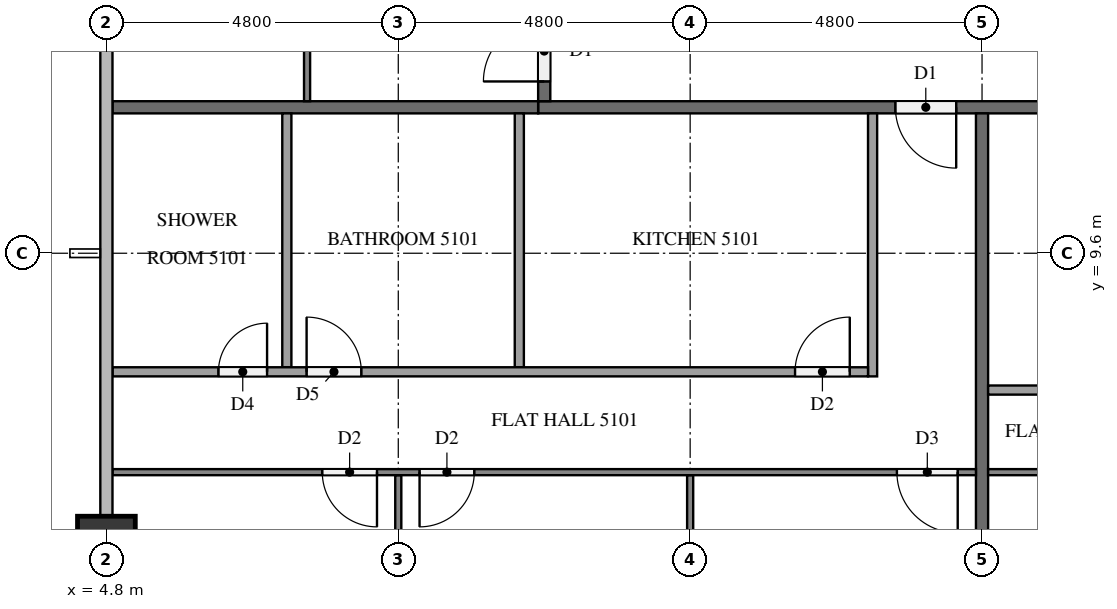
"""IFC4 building model, lengths in metres.
Left out: names, types, materials, properties, quantities, classifications, styles, units other than length and angle.
Written with IfcOpenShell. Run it as: python <this file> out.ifc"""

import sys

from ifc_helpers import new_model, si_unit, direction, frame, frame_2d, origin, origin_2d, place, context, subcontext, project, spatial, rectangle, extrude, element, fill, save


model = new_model("IFC4")
c1 = context("Model", 3, precision=1e-05, world=origin(), true_north=direction((0.0, 1.0)))
c2 = subcontext(c1, "Body", "Model", "MODEL_VIEW")
j1 = project(units=[si_unit("LENGTHUNIT", "METRE"), si_unit("PLANEANGLEUNIT", "RADIAN")], contexts=[c1])
p1 = place(None, origin())
s1 = spatial("IfcSite", under=j1, at=p1, CompositionType="ELEMENT")
p2 = place(p1, origin())
s2 = spatial("IfcBuilding", under=s1, at=p2, CompositionType="ELEMENT")
p3 = place(p2, frame((0.0, 0.0, 196.4)))
s3 = spatial("IfcBuildingStorey", under=s2, at=p3, CompositionType="ELEMENT", Elevation=196.4)
p4 = place(p3, frame((4.8, 4.8, 0.0), z_axis=(0.0, 0.0, 1.0), x_axis=(1.0, 0.0, 0.0)))
e1 = element("IfcColumn", 1, at=p4, inside=s3, PredefinedType="COLUMN", context=c2, shape_type="SweptSolid", body=[
    extrude(rectangle(XDim=0.95, YDim=0.95, at=origin_2d()), origin(), (0.0, 0.0, 1.0), 3.2),
])
p5 = place(p3, frame((50.5, 12.0, 0.0), z_axis=(0.0, 0.0, 1.0), x_axis=(-1.0, 0.0, 0.0)))
e2 = element("IfcWall", 2, at=p5, inside=s3, PredefinedType="PARTITIONING", context=c2, shape_type="SweptSolid", body=[
    extrude(rectangle(XDim=38.6, YDim=0.2, at=frame_2d((19.3, 0.0))), origin(), (0.0, 0.0, 1.0), 3.2),
])
p6 = place(p5, frame((31.725, 0.0, 0.0)))
e3 = element("IfcOpeningElement", 3, at=p6, cuts=e2, PredefinedType="OPENING", context=c2, shape_type="SweptSolid", body=[
    extrude(rectangle(XDim=1.0, YDim=2.1, at=frame_2d((0.5, 1.05))), frame((0.0, 0.11, 0.0), z_axis=(0.0, -1.0, 0.0), x_axis=(1.0, 0.0, 0.0)), (0.0, 0.0, 1.0), 0.22),
])
p7 = place(p5, frame((19.725, 0.0, 0.0)))
e4 = element("IfcOpeningElement", 4, at=p7, cuts=e2, PredefinedType="OPENING", context=c2, shape_type="SweptSolid", body=[
    extrude(rectangle(XDim=1.0, YDim=2.1, at=frame_2d((0.5, 1.05))), frame((0.0, 0.11, 0.0), z_axis=(0.0, -1.0, 0.0), x_axis=(1.0, 0.0, 0.0)), (0.0, 0.0, 1.0), 0.22),
])
p8 = place(p5, frame((17.875, 0.0, 0.0)))
e5 = element("IfcOpeningElement", 5, at=p8, cuts=e2, PredefinedType="OPENING", context=c2, shape_type="SweptSolid", body=[
    extrude(rectangle(XDim=1.0, YDim=2.1, at=frame_2d((0.5, 1.05))), frame((0.0, 0.11, 0.0), z_axis=(0.0, -1.0, 0.0), x_axis=(1.0, 0.0, 0.0)), (0.0, 0.0, 1.0), 0.22),
])
p9 = place(p5, frame((3.475, 0.0, 0.0)))
e6 = element("IfcOpeningElement", 6, at=p9, cuts=e2, PredefinedType="OPENING", context=c2, shape_type="SweptSolid", body=[
    extrude(rectangle(XDim=1.0, YDim=2.1, at=frame_2d((0.5, 1.05))), frame((0.0, 0.11, 0.0), z_axis=(0.0, -1.0, 0.0), x_axis=(1.0, 0.0, 0.0)), (0.0, 0.0, 1.0), 0.22),
])
p10 = place(p3, frame((12.0, 12.1, 0.0), z_axis=(0.0, 0.0, 1.0), x_axis=(0.0, 1.0, 0.0)))
e7 = element("IfcWall", 7, at=p10, inside=s3, PredefinedType="PARTITIONING", context=c2, shape_type="SweptSolid", body=[
    extrude(rectangle(XDim=28.6, YDim=0.2, at=frame_2d((14.3, 0.0))), origin(), (0.0, 0.0, 1.0), 3.2),
])
p11 = place(p10, frame((27.275, 0.0, 0.0)))
e8 = element("IfcOpeningElement", 8, at=p11, cuts=e7, PredefinedType="OPENING", context=c2, shape_type="SweptSolid", body=[
    extrude(rectangle(XDim=1.0, YDim=2.1, at=frame_2d((0.5, 1.05))), frame((0.0, 0.11, 0.0), z_axis=(0.0, -1.0, 0.0), x_axis=(1.0, 0.0, 0.0)), (0.0, 0.0, 1.0), 0.22),
])
p12 = place(p10, frame((0.325, 0.0, 0.0)))
e9 = element("IfcOpeningElement", 9, at=p12, cuts=e7, PredefinedType="OPENING", context=c2, shape_type="SweptSolid", body=[
    extrude(rectangle(XDim=1.0, YDim=2.1, at=frame_2d((0.5, 1.05))), frame((0.0, 0.11, 0.0), z_axis=(0.0, -1.0, 0.0), x_axis=(1.0, 0.0, 0.0)), (0.0, 0.0, 1.0), 0.22),
])
p13 = place(p3, frame((19.2, 11.9, 0.0), z_axis=(0.0, 0.0, 1.0), x_axis=(0.0, -1.0, 0.0)))
e10 = element("IfcWall", 10, at=p13, inside=s3, PredefinedType="PARTITIONING", context=c2, shape_type="SweptSolid", body=[
    extrude(rectangle(XDim=11.575, YDim=0.2, at=frame_2d((5.788, 0.0))), origin(), (0.0, 0.0, 1.0), 3.2),
])
p14 = place(p3, frame((4.9, 12.0, 0.0), z_axis=(0.0, 0.0, 1.0), x_axis=(1.0, 0.0, 0.0)))
e11 = element("IfcWall", 11, at=p14, inside=s3, PredefinedType="PARTITIONING", context=c2, shape_type="SweptSolid", body=[
    extrude(rectangle(XDim=7.0, YDim=0.2, at=frame_2d((3.5, 0.0))), origin(), (0.0, 0.0, 1.0), 3.2),
])
p15 = place(p3, frame((14.4, 5.95, 0.0), z_axis=(0.0, 0.0, 1.0), x_axis=(0.0, -1.0, 0.0)))
e12 = element("IfcWall", 12, at=p15, inside=s3, PredefinedType="PARTITIONING", context=c2, shape_type="SweptSolid", body=[
    extrude(rectangle(XDim=5.85, YDim=0.1, at=frame_2d((2.925, 0.0))), origin(), (0.0, 0.0, 1.0), 3.2),
])
p16 = place(p3, frame((9.6, 5.95, 0.0), z_axis=(0.0, 0.0, 1.0), x_axis=(0.0, -1.0, 0.0)))
e13 = element("IfcWall", 13, at=p16, inside=s3, PredefinedType="PARTITIONING", context=c2, shape_type="SweptSolid", body=[
    extrude(rectangle(XDim=5.475, YDim=0.1, at=frame_2d((2.737, 0.0))), origin(), (0.0, 0.0, 1.0), 3.2),
])
p17 = place(p3, frame((19.1, 6.0, 0.0), z_axis=(0.0, 0.0, 1.0), x_axis=(-1.0, 0.0, 0.0)))
e14 = element("IfcWall", 14, at=p17, inside=s3, PredefinedType="PARTITIONING", context=c2, shape_type="SweptSolid", body=[
    extrude(rectangle(XDim=14.2, YDim=0.1, at=frame_2d((7.1, 0.0))), origin(), (0.0, 0.0, 1.0), 3.2),
])
p18 = place(p17, frame((0.3, 0.0, 0.0)))
e15 = element("IfcOpeningElement", 15, at=p18, cuts=e14, PredefinedType="OPENING", context=c2, shape_type="SweptSolid", body=[
    extrude(rectangle(XDim=1.0, YDim=2.1, at=frame_2d((0.5, 1.05))), frame((0.0, 0.06, 0.0), z_axis=(0.0, -1.0, 0.0), x_axis=(1.0, 0.0, 0.0)), (0.0, 0.0, 1.0), 0.12),
])
p19 = place(p17, frame((8.25, 0.0, 0.0)))
e16 = element("IfcOpeningElement", 16, at=p19, cuts=e14, PredefinedType="OPENING", context=c2, shape_type="SweptSolid", body=[
    extrude(rectangle(XDim=0.9, YDim=2.1, at=frame_2d((0.45, 1.05))), frame((0.0, 0.06, 0.0), z_axis=(0.0, -1.0, 0.0), x_axis=(1.0, 0.0, 0.0)), (0.0, 0.0, 1.0), 0.12),
])
p20 = place(p17, frame((9.85, 0.0, 0.0)))
e17 = element("IfcOpeningElement", 17, at=p20, cuts=e14, PredefinedType="OPENING", context=c2, shape_type="SweptSolid", body=[
    extrude(rectangle(XDim=0.9, YDim=2.1, at=frame_2d((0.45, 1.05))), frame((0.0, 0.06, 0.0), z_axis=(0.0, -1.0, 0.0), x_axis=(1.0, 0.0, 0.0)), (0.0, 0.0, 1.0), 0.12),
])
for number, where, z_axis, x_axis in (
    (18, (11.59, 11.9, 0.0), (0.0, 0.0, 1.0), (0.0, -1.0, 0.0)),
    (19, (7.767, 11.9, 0.0), (0.0, 0.0, 1.0), (0.0, -1.0, 0.0)),
):
    element("IfcWall", number, at=place(p3, frame(where, z_axis=z_axis, x_axis=x_axis)), inside=s3, PredefinedType="PARTITIONING", context=c2, shape_type="SweptSolid", body=[
        extrude(rectangle(XDim=4.175, YDim=0.15, at=frame_2d((2.087, 0.0))), origin(), (0.0, 0.0, 1.0), 3.2),
    ])
p21 = place(p3, frame((17.4, 11.9, 0.0), z_axis=(0.0, 0.0, 1.0), x_axis=(0.0, -1.0, 0.0)))
e20 = element("IfcWall", 20, at=p21, inside=s3, PredefinedType="PARTITIONING", context=c2, shape_type="SweptSolid", body=[
    extrude(rectangle(XDim=4.325, YDim=0.15, at=frame_2d((2.163, 0.0))), origin(), (0.0, 0.0, 1.0), 3.2),
])
p22 = place(p3, frame((4.9, 7.65, 0.0), z_axis=(0.0, 0.0, 1.0), x_axis=(1.0, 0.0, 0.0)))
e21 = element("IfcWall", 21, at=p22, inside=s3, PredefinedType="PARTITIONING", context=c2, shape_type="SweptSolid", body=[
    extrude(rectangle(XDim=12.425, YDim=0.15, at=frame_2d((6.212, 0.0))), origin(), (0.0, 0.0, 1.0), 3.2),
])
p23 = place(p22, frame((11.225, 0.0, 0.0)))
e22 = element("IfcOpeningElement", 22, at=p23, cuts=e21, PredefinedType="OPENING", context=c2, shape_type="SweptSolid", body=[
    extrude(rectangle(XDim=0.9, YDim=2.1, at=frame_2d((0.45, 1.05))), frame((0.0, 0.085, 0.0), z_axis=(0.0, -1.0, 0.0), x_axis=(1.0, 0.0, 0.0)), (0.0, 0.0, 1.0), 0.17),
])
p24 = place(p22, frame((3.192, 0.0, 0.0)))
e23 = element("IfcOpeningElement", 23, at=p24, cuts=e21, PredefinedType="OPENING", context=c2, shape_type="SweptSolid", body=[
    extrude(rectangle(XDim=0.9, YDim=2.1, at=frame_2d((0.45, 1.05))), frame((0.0, 0.085, 0.0), z_axis=(0.0, -1.0, 0.0), x_axis=(1.0, 0.0, 0.0)), (0.0, 0.0, 1.0), 0.17),
])
p25 = place(p22, frame((1.742, 0.0, 0.0)))
e24 = element("IfcOpeningElement", 24, at=p25, cuts=e21, PredefinedType="OPENING", context=c2, shape_type="SweptSolid", body=[
    extrude(rectangle(XDim=0.8, YDim=2.1, at=frame_2d((0.4, 1.05))), frame((0.0, 0.085, 0.0), z_axis=(0.0, -1.0, 0.0), x_axis=(1.0, 0.0, 0.0)), (0.0, 0.0, 1.0), 0.17),
])
p26 = place(p3, frame((31.1, 6.0, 0.0), z_axis=(0.0, 0.0, 1.0), x_axis=(-1.0, 0.0, 0.0)))
e25 = element("IfcWall", 25, at=p26, inside=s3, PredefinedType="PARTITIONING", context=c2, shape_type="SweptSolid", body=[
    extrude(rectangle(XDim=11.8, YDim=0.1, at=frame_2d((5.9, 0.0))), origin(), (0.0, 0.0, 1.0), 3.2),
])
p27 = place(p26, frame((5.75, 0.0, 0.0)))
e26 = element("IfcOpeningElement", 26, at=p27, cuts=e25, PredefinedType="OPENING", context=c2, shape_type="SweptSolid", body=[
    extrude(rectangle(XDim=1.0, YDim=2.1, at=frame_2d((0.5, 1.05))), frame((0.0, 0.06, 0.0), z_axis=(0.0, -1.0, 0.0), x_axis=(1.0, 0.0, 0.0)), (0.0, 0.0, 1.0), 0.12),
])
p28 = place(p26, frame((7.45, 0.0, 0.0)))
e27 = element("IfcOpeningElement", 27, at=p28, cuts=e25, PredefinedType="OPENING", context=c2, shape_type="SweptSolid", body=[
    extrude(rectangle(XDim=0.9, YDim=2.1, at=frame_2d((0.45, 1.05))), frame((0.0, 0.06, 0.0), z_axis=(0.0, -1.0, 0.0), x_axis=(1.0, 0.0, 0.0)), (0.0, 0.0, 1.0), 0.12),
])
p29 = place(p3, frame((19.3, 7.35, 0.0), z_axis=(0.0, 0.0, 1.0), x_axis=(1.0, 0.0, 0.0)))
e28 = element("IfcWall", 28, at=p29, inside=s3, PredefinedType="PARTITIONING", context=c2, shape_type="SweptSolid", body=[
    extrude(rectangle(XDim=10.025, YDim=0.15, at=frame_2d((5.012, 0.0))), origin(), (0.0, 0.0, 1.0), 3.2),
])
p30 = place(p29, frame((6.34, 0.0, 0.0)))
e29 = element("IfcOpeningElement", 29, at=p30, cuts=e28, PredefinedType="OPENING", context=c2, shape_type="SweptSolid", body=[
    extrude(rectangle(XDim=0.8, YDim=2.1, at=frame_2d((0.4, 1.05))), frame((0.0, 0.085, 0.0), z_axis=(0.0, -1.0, 0.0), x_axis=(1.0, 0.0, 0.0)), (0.0, 0.0, 1.0), 0.17),
])
p31 = place(p29, frame((4.79, 0.0, 0.0)))
e30 = element("IfcOpeningElement", 30, at=p31, cuts=e28, PredefinedType="OPENING", context=c2, shape_type="SweptSolid", body=[
    extrude(rectangle(XDim=0.9, YDim=2.1, at=frame_2d((0.45, 1.05))), frame((0.0, 0.085, 0.0), z_axis=(0.0, -1.0, 0.0), x_axis=(1.0, 0.0, 0.0)), (0.0, 0.0, 1.0), 0.17),
])
p32 = place(p3, frame((8.1, 12.1, 0.0), z_axis=(0.0, 0.0, 1.0), x_axis=(0.0, 1.0, 0.0)))
e31 = element("IfcWall", 31, at=p32, inside=s3, PredefinedType="PARTITIONING", context=c2, shape_type="SweptSolid", body=[
    extrude(rectangle(XDim=14.2, YDim=0.1, at=frame_2d((7.1, 0.0))), origin(), (0.0, 0.0, 1.0), 3.2),
])
p33 = place(p32, frame((3.45, 0.0, 0.0)))
e32 = element("IfcOpeningElement", 32, at=p33, cuts=e31, PredefinedType="OPENING", context=c2, shape_type="SweptSolid", body=[
    extrude(rectangle(XDim=0.9, YDim=2.1, at=frame_2d((0.45, 1.05))), frame((0.0, 0.06, 0.0), z_axis=(0.0, -1.0, 0.0), x_axis=(1.0, 0.0, 0.0)), (0.0, 0.0, 1.0), 0.12),
])
p34 = place(p32, frame((5.05, 0.0, 0.0)))
e33 = element("IfcOpeningElement", 33, at=p34, cuts=e31, PredefinedType="OPENING", context=c2, shape_type="SweptSolid", body=[
    extrude(rectangle(XDim=1.0, YDim=2.1, at=frame_2d((0.5, 1.05))), frame((0.0, 0.06, 0.0), z_axis=(0.0, -1.0, 0.0), x_axis=(1.0, 0.0, 0.0)), (0.0, 0.0, 1.0), 0.12),
])
p35 = place(p32, frame((13.0, 0.0, 0.0)))
e34 = element("IfcOpeningElement", 34, at=p35, cuts=e31, PredefinedType="OPENING", context=c2, shape_type="SweptSolid", body=[
    extrude(rectangle(XDim=0.9, YDim=2.1, at=frame_2d((0.45, 1.05))), frame((0.0, 0.06, 0.0), z_axis=(0.0, -1.0, 0.0), x_axis=(1.0, 0.0, 0.0)), (0.0, 0.0, 1.0), 0.12),
])
p36 = place(p6, origin())
e35 = element("IfcDoor", 35, at=p36, inside=s3, OperationType="SINGLE_SWING_LEFT", PredefinedType="DOOR", context=c2, shape_type="SweptSolid", body=[
    extrude(rectangle(XDim=1.0, YDim=2.1, at=frame_2d((0.5, 1.05))), frame((0.0, 0.025, 0.0), z_axis=(0.0, -1.0, 0.0), x_axis=(1.0, 0.0, 0.0)), (0.0, 0.0, 1.0), 0.05),
])
fill(e3, e35)
p37 = place(p12, origin())
e36 = element("IfcDoor", 36, at=p37, inside=s3, OperationType="SINGLE_SWING_LEFT", PredefinedType="DOOR", context=c2, shape_type="SweptSolid", body=[
    extrude(rectangle(XDim=1.0, YDim=2.1, at=frame_2d((0.5, 1.05))), frame((0.0, 0.025, 0.0), z_axis=(0.0, -1.0, 0.0), x_axis=(1.0, 0.0, 0.0)), (0.0, 0.0, 1.0), 0.05),
])
fill(e9, e36)
p38 = place(p18, origin())
e37 = element("IfcDoor", 37, at=p38, inside=s3, OperationType="SINGLE_SWING_LEFT", PredefinedType="DOOR", context=c2, shape_type="SweptSolid", body=[
    extrude(rectangle(XDim=1.0, YDim=2.1, at=frame_2d((0.5, 1.05))), frame((0.0, 0.025, 0.0), z_axis=(0.0, -1.0, 0.0), x_axis=(1.0, 0.0, 0.0)), (0.0, 0.0, 1.0), 0.05),
])
fill(e15, e37)
p39 = place(p19, origin())
e38 = element("IfcDoor", 38, at=p39, inside=s3, OperationType="SINGLE_SWING_RIGHT", PredefinedType="DOOR", context=c2, shape_type="SweptSolid", body=[
    extrude(rectangle(XDim=0.9, YDim=2.1, at=frame_2d((0.45, 1.05))), frame((0.0, 0.025, 0.0), z_axis=(0.0, -1.0, 0.0), x_axis=(1.0, 0.0, 0.0)), (0.0, 0.0, 1.0), 0.05),
])
fill(e16, e38)
p40 = place(p20, origin())
e39 = element("IfcDoor", 39, at=p40, inside=s3, OperationType="SINGLE_SWING_LEFT", PredefinedType="DOOR", context=c2, shape_type="SweptSolid", body=[
    extrude(rectangle(XDim=0.9, YDim=2.1, at=frame_2d((0.45, 1.05))), frame((0.0, 0.025, 0.0), z_axis=(0.0, -1.0, 0.0), x_axis=(1.0, 0.0, 0.0)), (0.0, 0.0, 1.0), 0.05),
])
fill(e17, e39)
p41 = place(p23, origin())
e40 = element("IfcDoor", 40, at=p41, inside=s3, OperationType="SINGLE_SWING_RIGHT", PredefinedType="DOOR", context=c2, shape_type="SweptSolid", body=[
    extrude(rectangle(XDim=0.9, YDim=2.1, at=frame_2d((0.45, 1.05))), frame((0.0, 0.025, 0.0), z_axis=(0.0, -1.0, 0.0), x_axis=(1.0, 0.0, 0.0)), (0.0, 0.0, 1.0), 0.05),
])
fill(e22, e40)
p42 = place(p24, origin())
e41 = element("IfcDoor", 41, at=p42, inside=s3, OperationType="SINGLE_SWING_LEFT", PredefinedType="DOOR", context=c2, shape_type="SweptSolid", body=[
    extrude(rectangle(XDim=0.9, YDim=2.1, at=frame_2d((0.45, 1.05))), frame((0.0, 0.025, 0.0), z_axis=(0.0, -1.0, 0.0), x_axis=(1.0, 0.0, 0.0)), (0.0, 0.0, 1.0), 0.05),
])
fill(e23, e41)
p43 = place(p25, origin())
e42 = element("IfcDoor", 42, at=p43, inside=s3, OperationType="SINGLE_SWING_RIGHT", PredefinedType="DOOR", context=c2, shape_type="SweptSolid", body=[
    extrude(rectangle(XDim=0.8, YDim=2.1, at=frame_2d((0.4, 1.05))), frame((0.0, 0.025, 0.0), z_axis=(0.0, -1.0, 0.0), x_axis=(1.0, 0.0, 0.0)), (0.0, 0.0, 1.0), 0.05),
])
fill(e24, e42)
save(model, sys.argv[1])
